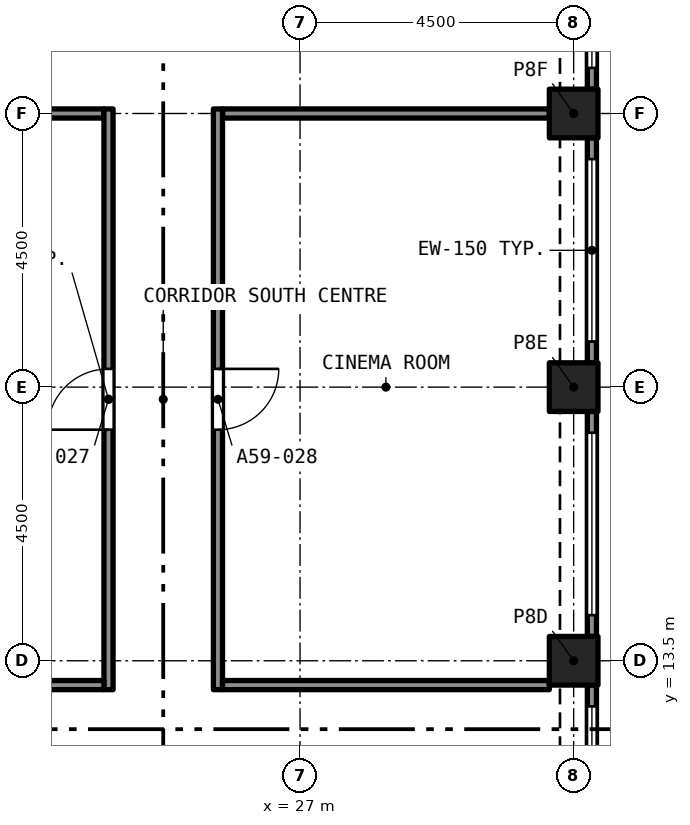
"""IFC4 building model, lengths in metres.
Left out: names, types, materials, properties, quantities, classifications, styles, units other than length and angle.
Written with IfcOpenShell. Run it as: python <this file> out.ifc"""

import sys

from ifc_helpers import new_model, si_unit, direction, frame, frame_2d, origin, origin_2d, place, context, subcontext, project, spatial, rectangle, extrude, element, fill, save


model = new_model("IFC4")
c1 = context("Model", 3, precision=1e-05, world=origin(), true_north=direction((0.0, 1.0)))
c2 = subcontext(c1, "Body", "Model", "MODEL_VIEW")
j1 = project(units=[si_unit("LENGTHUNIT", "METRE"), si_unit("PLANEANGLEUNIT", "RADIAN")], contexts=[c1])
p1 = place(None, origin())
s1 = spatial("IfcSite", under=j1, at=p1, CompositionType="ELEMENT")
p2 = place(p1, origin())
s2 = spatial("IfcBuilding", under=s1, at=p2, CompositionType="ELEMENT")
p3 = place(p2, frame((0.0, 0.0, 213.295)))
s3 = spatial("IfcBuildingStorey", under=s2, at=p3, CompositionType="ELEMENT", Elevation=213.295)
for number, where, z_axis, x_axis in (
    (1, (31.5, 13.5, 0.0), (0.0, 0.0, 1.0), (1.0, 0.0, 0.0)),
    (2, (31.5, 18.0, 0.0), (0.0, 0.0, 1.0), (1.0, 0.0, 0.0)),
    (3, (31.5, 22.5, 0.0), (0.0, 0.0, 1.0), (1.0, 0.0, 0.0)),
):
    element("IfcColumn", number, at=place(p3, frame(where, z_axis=z_axis, x_axis=x_axis)), inside=s3, PredefinedType="COLUMN", context=c2, shape_type="SweptSolid", body=[
        extrude(rectangle(XDim=0.8, YDim=0.8, at=origin_2d()), origin(), (0.0, 0.0, 1.0), 3.2),
    ])
p4 = place(p3, frame((31.8, 13.1, 0.0), z_axis=(0.0, 0.0, 1.0), x_axis=(0.0, -1.0, 0.0)))
e4 = element("IfcWall", 4, at=p4, inside=s3, PredefinedType="SOLIDWALL", context=c2, shape_type="SweptSolid", body=[
    extrude(rectangle(XDim=3.7, YDim=0.15, at=frame_2d((1.85, 0.0))), origin(), (0.0, 0.0, 1.0), 3.2),
])
p5 = place(p4, frame((0.35, 0.0, 0.45)))
e5 = element("IfcOpeningElement", 5, at=p5, cuts=e4, PredefinedType="OPENING", context=c2, shape_type="SweptSolid", body=[
    extrude(rectangle(XDim=3.0, YDim=1.95, at=frame_2d((1.5, 0.975))), frame((0.0, 0.085, 0.0), z_axis=(0.0, -1.0, 0.0), x_axis=(1.0, 0.0, 0.0)), (0.0, 0.0, 1.0), 0.17),
])
p6 = place(p3, frame((31.8, 17.6, 0.0), z_axis=(0.0, 0.0, 1.0), x_axis=(0.0, -1.0, 0.0)))
e6 = element("IfcWall", 6, at=p6, inside=s3, PredefinedType="SOLIDWALL", context=c2, shape_type="SweptSolid", body=[
    extrude(rectangle(XDim=3.7, YDim=0.15, at=frame_2d((1.85, 0.0))), origin(), (0.0, 0.0, 1.0), 3.2),
])
p7 = place(p6, frame((0.35, 0.0, 0.45)))
e7 = element("IfcOpeningElement", 7, at=p7, cuts=e6, PredefinedType="OPENING", context=c2, shape_type="SweptSolid", body=[
    extrude(rectangle(XDim=3.0, YDim=1.95, at=frame_2d((1.5, 0.975))), frame((0.0, 0.085, 0.0), z_axis=(0.0, -1.0, 0.0), x_axis=(1.0, 0.0, 0.0)), (0.0, 0.0, 1.0), 0.17),
])
p8 = place(p3, frame((31.8, 22.1, 0.0), z_axis=(0.0, 0.0, 1.0), x_axis=(0.0, -1.0, 0.0)))
e8 = element("IfcWall", 8, at=p8, inside=s3, PredefinedType="SOLIDWALL", context=c2, shape_type="SweptSolid", body=[
    extrude(rectangle(XDim=3.7, YDim=0.15, at=frame_2d((1.85, 0.0))), origin(), (0.0, 0.0, 1.0), 3.2),
])
p9 = place(p8, frame((0.35, 0.0, 0.45)))
e9 = element("IfcOpeningElement", 9, at=p9, cuts=e8, PredefinedType="OPENING", context=c2, shape_type="SweptSolid", body=[
    extrude(rectangle(XDim=3.0, YDim=1.95, at=frame_2d((1.5, 0.975))), frame((0.0, 0.085, 0.0), z_axis=(0.0, -1.0, 0.0), x_axis=(1.0, 0.0, 0.0)), (0.0, 0.0, 1.0), 0.17),
])
p10 = place(p3, frame((31.8, 26.6, 0.0), z_axis=(0.0, 0.0, 1.0), x_axis=(0.0, -1.0, 0.0)))
e10 = element("IfcWall", 10, at=p10, inside=s3, PredefinedType="SOLIDWALL", context=c2, shape_type="SweptSolid", body=[
    extrude(rectangle(XDim=3.7, YDim=0.15, at=frame_2d((1.85, 0.0))), origin(), (0.0, 0.0, 1.0), 3.2),
])
p11 = place(p10, frame((0.35, 0.0, 0.45)))
e11 = element("IfcOpeningElement", 11, at=p11, cuts=e10, PredefinedType="OPENING", context=c2, shape_type="SweptSolid", body=[
    extrude(rectangle(XDim=3.0, YDim=1.95, at=frame_2d((1.5, 0.975))), frame((0.0, 0.085, 0.0), z_axis=(0.0, -1.0, 0.0), x_axis=(1.0, 0.0, 0.0)), (0.0, 0.0, 1.0), 0.17),
])
for number, where, z_axis, x_axis in (
    (12, (18.4, 22.5, 0.0), (0.0, 0.0, 1.0), (1.0, 0.0, 0.0)),
    (13, (25.725, 22.5, 0.0), (0.0, 0.0, 1.0), (1.0, 0.0, 0.0)),
):
    element("IfcWall", number, at=place(p3, frame(where, z_axis=z_axis, x_axis=x_axis)), inside=s3, PredefinedType="PARTITIONING", context=c2, shape_type="SweptSolid", body=[
        extrude(rectangle(XDim=5.375, YDim=0.15, at=frame_2d((2.688, 0.0))), origin(), (0.0, 0.0, 1.0), 2.75),
    ])
p12 = place(p3, frame((23.85, 13.025, 0.0), z_axis=(0.0, 0.0, 1.0), x_axis=(0.0, 1.0, 0.0)))
e14 = element("IfcWall", 14, at=p12, inside=s3, PredefinedType="PARTITIONING", context=c2, shape_type="SweptSolid", body=[
    extrude(rectangle(XDim=9.55, YDim=0.15, at=frame_2d((4.775, 0.0))), origin(), (0.0, 0.0, 1.0), 2.75),
])
p13 = place(p12, frame((4.275, 0.0, 0.0)))
e15 = element("IfcOpeningElement", 15, at=p13, cuts=e14, PredefinedType="OPENING", context=c2, shape_type="SweptSolid", body=[
    extrude(rectangle(XDim=1.0, YDim=2.1, at=frame_2d((0.5, 1.05))), frame((0.0, 0.085, 0.0), z_axis=(0.0, -1.0, 0.0), x_axis=(1.0, 0.0, 0.0)), (0.0, 0.0, 1.0), 0.17),
])
p14 = place(p3, frame((25.65, 22.575, 0.0), z_axis=(0.0, 0.0, 1.0), x_axis=(0.0, -1.0, 0.0)))
e16 = element("IfcWall", 16, at=p14, inside=s3, PredefinedType="PARTITIONING", context=c2, shape_type="SweptSolid", body=[
    extrude(rectangle(XDim=9.55, YDim=0.15, at=frame_2d((4.775, 0.0))), origin(), (0.0, 0.0, 1.0), 2.75),
])
p15 = place(p14, frame((4.275, 0.0, 0.0)))
e17 = element("IfcOpeningElement", 17, at=p15, cuts=e16, PredefinedType="OPENING", context=c2, shape_type="SweptSolid", body=[
    extrude(rectangle(XDim=1.0, YDim=2.1, at=frame_2d((0.5, 1.05))), frame((0.0, 0.085, 0.0), z_axis=(0.0, -1.0, 0.0), x_axis=(1.0, 0.0, 0.0)), (0.0, 0.0, 1.0), 0.17),
])
for number, where, z_axis, x_axis in (
    (18, (18.4, 13.1, 0.0), (0.0, 0.0, 1.0), (1.0, 0.0, 0.0)),
    (19, (25.725, 13.1, 0.0), (0.0, 0.0, 1.0), (1.0, 0.0, 0.0)),
):
    element("IfcWall", number, at=place(p3, frame(where, z_axis=z_axis, x_axis=x_axis)), inside=s3, PredefinedType="PARTITIONING", context=c2, shape_type="SweptSolid", body=[
        extrude(rectangle(XDim=5.375, YDim=0.15, at=frame_2d((2.688, 0.0))), origin(), (0.0, 0.0, 1.0), 2.75),
    ])
p16 = place(p5, origin())
e20 = element("IfcWindow", 20, at=p16, inside=s3, PartitioningType="SINGLE_PANEL", PredefinedType="WINDOW", context=c2, shape_type="SweptSolid", body=[
    extrude(rectangle(XDim=3.0, YDim=1.95, at=frame_2d((1.5, 0.975))), frame((0.0, 0.03, 0.0), z_axis=(0.0, -1.0, 0.0), x_axis=(1.0, 0.0, 0.0)), (0.0, 0.0, 1.0), 0.06),
])
fill(e5, e20)
p17 = place(p7, origin())
e21 = element("IfcWindow", 21, at=p17, inside=s3, PartitioningType="SINGLE_PANEL", PredefinedType="WINDOW", context=c2, shape_type="SweptSolid", body=[
    extrude(rectangle(XDim=3.0, YDim=1.95, at=frame_2d((1.5, 0.975))), frame((0.0, 0.03, 0.0), z_axis=(0.0, -1.0, 0.0), x_axis=(1.0, 0.0, 0.0)), (0.0, 0.0, 1.0), 0.06),
])
fill(e7, e21)
p18 = place(p9, origin())
e22 = element("IfcWindow", 22, at=p18, inside=s3, PartitioningType="SINGLE_PANEL", PredefinedType="WINDOW", context=c2, shape_type="SweptSolid", body=[
    extrude(rectangle(XDim=3.0, YDim=1.95, at=frame_2d((1.5, 0.975))), frame((0.0, 0.03, 0.0), z_axis=(0.0, -1.0, 0.0), x_axis=(1.0, 0.0, 0.0)), (0.0, 0.0, 1.0), 0.06),
])
fill(e9, e22)
p19 = place(p11, origin())
e23 = element("IfcWindow", 23, at=p19, inside=s3, PartitioningType="SINGLE_PANEL", PredefinedType="WINDOW", context=c2, shape_type="SweptSolid", body=[
    extrude(rectangle(XDim=3.0, YDim=1.95, at=frame_2d((1.5, 0.975))), frame((0.0, 0.03, 0.0), z_axis=(0.0, -1.0, 0.0), x_axis=(1.0, 0.0, 0.0)), (0.0, 0.0, 1.0), 0.06),
])
fill(e11, e23)
p20 = place(p13, origin())
e24 = element("IfcDoor", 24, at=p20, inside=s3, OperationType="SINGLE_SWING_RIGHT", PredefinedType="DOOR", context=c2, shape_type="SweptSolid", body=[
    extrude(rectangle(XDim=1.0, YDim=2.1, at=frame_2d((0.5, 1.05))), frame((0.0, 0.025, 0.0), z_axis=(0.0, -1.0, 0.0), x_axis=(1.0, 0.0, 0.0)), (0.0, 0.0, 1.0), 0.05),
])
fill(e15, e24)
p21 = place(p15, origin())
e25 = element("IfcDoor", 25, at=p21, inside=s3, OperationType="SINGLE_SWING_LEFT", PredefinedType="DOOR", context=c2, shape_type="SweptSolid", body=[
    extrude(rectangle(XDim=1.0, YDim=2.1, at=frame_2d((0.5, 1.05))), frame((0.0, 0.025, 0.0), z_axis=(0.0, -1.0, 0.0), x_axis=(1.0, 0.0, 0.0)), (0.0, 0.0, 1.0), 0.05),
])
fill(e17, e25)
save(model, sys.argv[1])
